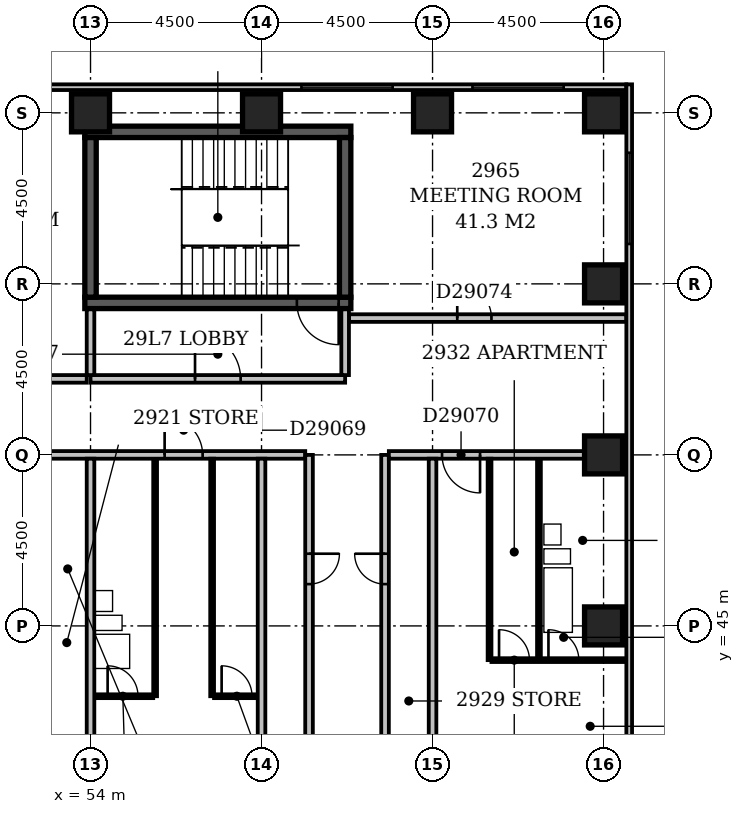
"""IFC4 building model, lengths in metres.
Left out: names, types, materials, properties, quantities, classifications, styles, units other than length and angle.
Written with IfcOpenShell. Run it as: python <this file> out.ifc"""

import sys

from ifc_helpers import new_model, si_unit, direction, frame, frame_2d, origin, origin_2d, place, context, subcontext, project, spatial, rectangle, extrude, element, fill, save


model = new_model("IFC4")
c1 = context("Model", 3, precision=1e-05, world=origin(), true_north=direction((0.0, 1.0)))
c2 = subcontext(c1, "Body", "Model", "MODEL_VIEW")
j1 = project(units=[si_unit("LENGTHUNIT", "METRE"), si_unit("PLANEANGLEUNIT", "RADIAN")], contexts=[c1])
p1 = place(None, origin())
s1 = spatial("IfcSite", under=j1, at=p1, CompositionType="ELEMENT")
p2 = place(p1, origin())
s2 = spatial("IfcBuilding", under=s1, at=p2, CompositionType="ELEMENT")
p3 = place(p2, frame((0.0, 0.0, 119.6)))
s3 = spatial("IfcBuildingStorey", under=s2, at=p3, CompositionType="ELEMENT", Elevation=119.6)
p4 = place(p3, frame((53.85, 53.5, -0.3), z_axis=(0.0, 0.0, 1.0), x_axis=(1.0, 0.0, 0.0)))
e1 = element("IfcWall", 1, at=p4, inside=s3, PredefinedType="SHEAR", context=c2, shape_type="SweptSolid", body=[
    extrude(rectangle(XDim=7.0, YDim=0.3, at=frame_2d((3.5, 0.0))), origin(), (0.0, 0.0, 1.0), 3.6),
])
p5 = place(p4, frame((5.58, 0.0, 0.3)))
e2 = element("IfcOpeningElement", 2, at=p5, cuts=e1, PredefinedType="OPENING", context=c2, shape_type="SweptSolid", body=[
    extrude(rectangle(XDim=1.1, YDim=2.1, at=frame_2d((0.55, 1.05))), frame((0.0, 0.162, 0.0), z_axis=(0.0, -1.0, 0.0), x_axis=(1.0, 0.0, 0.0)), (0.0, 0.0, 1.0), 0.324),
])
p6 = place(p3, frame((53.85, 58.0, -0.3), z_axis=(0.0, 0.0, 1.0), x_axis=(1.0, 0.0, 0.0)))
e3 = element("IfcWall", 3, at=p6, inside=s3, PredefinedType="SHEAR", context=c2, shape_type="SweptSolid", body=[
    extrude(rectangle(XDim=7.0, YDim=0.3, at=frame_2d((3.5, 0.0))), origin(), (0.0, 0.0, 1.0), 3.6),
])
for number, where, z_axis, x_axis in (
    (4, (54.0, 53.65, -0.3), (0.0, 0.0, 1.0), (0.0, 1.0, 0.0)),
    (5, (60.7, 53.65, -0.3), (0.0, 0.0, 1.0), (0.0, 1.0, 0.0)),
):
    element("IfcWall", number, at=place(p3, frame(where, z_axis=z_axis, x_axis=x_axis)), inside=s3, PredefinedType="SHEAR", context=c2, shape_type="SweptSolid", body=[
        extrude(rectangle(XDim=4.2, YDim=0.3, at=frame_2d((2.1, 0.0))), origin(), (0.0, 0.0, 1.0), 3.6),
    ])
for number, where, z_axis, x_axis in (
    (6, (67.5, 45.0, -0.3), (0.0, 0.0, 1.0), (1.0, 0.0, 0.0)),
    (7, (67.5, 49.5, -0.3), (0.0, 0.0, 1.0), (1.0, 0.0, 0.0)),
    (8, (67.5, 54.0, -0.3), (0.0, 0.0, 1.0), (1.0, 0.0, 0.0)),
    (9, (54.0, 58.5, -0.3), (0.0, 0.0, 1.0), (1.0, 0.0, 0.0)),
    (10, (58.5, 58.5, -0.3), (0.0, 0.0, 1.0), (1.0, 0.0, 0.0)),
    (11, (63.0, 58.5, -0.3), (0.0, 0.0, 1.0), (1.0, 0.0, 0.0)),
    (12, (67.5, 58.5, -0.3), (0.0, 0.0, 1.0), (1.0, 0.0, 0.0)),
):
    element("IfcColumn", number, at=place(p3, frame(where, z_axis=z_axis, x_axis=x_axis)), inside=s3, PredefinedType="COLUMN", context=c2, shape_type="SweptSolid", body=[
        extrude(rectangle(XDim=1.0, YDim=1.0, at=origin_2d()), origin(), (0.0, 0.0, 1.0), 3.6),
    ])
p7 = place(p3, frame((68.175, 35.4, 0.0), z_axis=(0.0, 0.0, 1.0), x_axis=(0.0, 1.0, 0.0)))
e13 = element("IfcWall", 13, at=p7, inside=s3, PredefinedType="STANDARD", context=c2, shape_type="SweptSolid", body=[
    extrude(rectangle(XDim=23.85, YDim=0.15, at=frame_2d((11.925, 0.0))), origin(), (0.0, 0.0, 1.0), 2.7),
])
p8 = place(p7, frame((1.65, 0.0, 0.6)))
e14 = element("IfcOpeningElement", 14, at=p8, cuts=e13, PredefinedType="OPENING", context=c2, shape_type="SweptSolid", body=[
    extrude(rectangle(XDim=2.4, YDim=1.8, at=frame_2d((1.2, 0.9))), frame((0.0, 0.087, 0.0), z_axis=(0.0, -1.0, 0.0), x_axis=(1.0, 0.0, 0.0)), (0.0, 0.0, 1.0), 0.174),
])
p9 = place(p7, frame((19.65, 0.0, 0.6)))
e15 = element("IfcOpeningElement", 15, at=p9, cuts=e13, PredefinedType="OPENING", context=c2, shape_type="SweptSolid", body=[
    extrude(rectangle(XDim=2.4, YDim=1.8, at=frame_2d((1.2, 0.9))), frame((0.0, 0.087, 0.0), z_axis=(0.0, -1.0, 0.0), x_axis=(1.0, 0.0, 0.0)), (0.0, 0.0, 1.0), 0.174),
])
p10 = place(p3, frame((68.1, 59.175, 0.0), z_axis=(0.0, 0.0, 1.0), x_axis=(-1.0, 0.0, 0.0)))
e16 = element("IfcWall", 16, at=p10, inside=s3, PredefinedType="STANDARD", context=c2, shape_type="SweptSolid", body=[
    extrude(rectangle(XDim=68.85, YDim=0.15, at=frame_2d((34.425, 0.0))), origin(), (0.0, 0.0, 1.0), 2.7),
])
p11 = place(p10, frame((1.65, 0.0, 0.6)))
e17 = element("IfcOpeningElement", 17, at=p11, cuts=e16, PredefinedType="OPENING", context=c2, shape_type="SweptSolid", body=[
    extrude(rectangle(XDim=2.4, YDim=1.8, at=frame_2d((1.2, 0.9))), frame((0.0, 0.087, 0.0), z_axis=(0.0, -1.0, 0.0), x_axis=(1.0, 0.0, 0.0)), (0.0, 0.0, 1.0), 0.174),
])
p12 = place(p10, frame((6.15, 0.0, 0.6)))
e18 = element("IfcOpeningElement", 18, at=p12, cuts=e16, PredefinedType="OPENING", context=c2, shape_type="SweptSolid", body=[
    extrude(rectangle(XDim=2.4, YDim=1.8, at=frame_2d((1.2, 0.9))), frame((0.0, 0.087, 0.0), z_axis=(0.0, -1.0, 0.0), x_axis=(1.0, 0.0, 0.0)), (0.0, 0.0, 1.0), 0.174),
])
p13 = place(p10, frame((16.347, 0.0, 0.6)))
e19 = element("IfcOpeningElement", 19, at=p13, cuts=e16, PredefinedType="OPENING", context=c2, shape_type="SweptSolid", body=[
    extrude(rectangle(XDim=1.5, YDim=1.8, at=frame_2d((0.75, 0.9))), frame((0.0, 0.087, 0.0), z_axis=(0.0, -1.0, 0.0), x_axis=(1.0, 0.0, 0.0)), (0.0, 0.0, 1.0), 0.174),
])
p14 = place(p10, frame((19.65, 0.0, 0.6)))
e20 = element("IfcOpeningElement", 20, at=p14, cuts=e16, PredefinedType="OPENING", context=c2, shape_type="SweptSolid", body=[
    extrude(rectangle(XDim=2.4, YDim=1.8, at=frame_2d((1.2, 0.9))), frame((0.0, 0.087, 0.0), z_axis=(0.0, -1.0, 0.0), x_axis=(1.0, 0.0, 0.0)), (0.0, 0.0, 1.0), 0.174),
])
p15 = place(p10, frame((37.678, 0.0, 0.6)))
e21 = element("IfcOpeningElement", 21, at=p15, cuts=e16, PredefinedType="OPENING", context=c2, shape_type="SweptSolid", body=[
    extrude(rectangle(XDim=1.2, YDim=1.8, at=frame_2d((0.6, 0.9))), frame((0.0, 0.087, 0.0), z_axis=(0.0, -1.0, 0.0), x_axis=(1.0, 0.0, 0.0)), (0.0, 0.0, 1.0), 0.174),
])
p16 = place(p3, frame((54.0, 51.5, 0.0), z_axis=(0.0, 0.0, 1.0), x_axis=(1.0, 0.0, 0.0)))
e22 = element("IfcWall", 22, at=p16, inside=s3, PredefinedType="PARTITIONING", context=c2, shape_type="SweptSolid", body=[
    extrude(rectangle(XDim=6.7, YDim=0.2, at=frame_2d((3.35, 0.0))), origin(), (0.0, 0.0, 1.0), 3.3),
])
p17 = place(p16, frame((2.75, 0.0, 0.0)))
e23 = element("IfcOpeningElement", 23, at=p17, cuts=e22, PredefinedType="OPENING", context=c2, shape_type="SweptSolid", body=[
    extrude(rectangle(XDim=1.2, YDim=2.1, at=frame_2d((0.6, 1.05))), frame((0.0, 0.112, 0.0), z_axis=(0.0, -1.0, 0.0), x_axis=(1.0, 0.0, 0.0)), (0.0, 0.0, 1.0), 0.224),
])
p18 = place(p3, frame((60.7, 51.6, 0.0), z_axis=(0.0, 0.0, 1.0), x_axis=(0.0, 1.0, 0.0)))
e24 = element("IfcWall", 24, at=p18, inside=s3, PredefinedType="PARTITIONING", context=c2, shape_type="SweptSolid", body=[
    extrude(rectangle(XDim=1.73, YDim=0.2, at=frame_2d((0.865, 0.0))), origin(), (0.0, 0.0, 1.0), 3.3),
])
p19 = place(p3, frame((54.0, 51.6, 0.0), z_axis=(0.0, 0.0, 1.0), x_axis=(0.0, 1.0, 0.0)))
e25 = element("IfcWall", 25, at=p19, inside=s3, PredefinedType="PARTITIONING", context=c2, shape_type="SweptSolid", body=[
    extrude(rectangle(XDim=1.73, YDim=0.2, at=frame_2d((0.865, 0.0))), origin(), (0.0, 0.0, 1.0), 2.6),
])
p20 = place(p3, frame((54.0, 36.5, 0.0), z_axis=(0.0, 0.0, 1.0), x_axis=(0.0, 1.0, 0.0)))
e26 = element("IfcWall", 26, at=p20, inside=s3, PredefinedType="PARTITIONING", context=c2, shape_type="SweptSolid", body=[
    extrude(rectangle(XDim=12.9, YDim=0.2, at=frame_2d((6.45, 0.0))), origin(), (0.0, 0.0, 1.0), 2.6),
])
p21 = place(p3, frame((58.5, 36.5, 0.0), z_axis=(0.0, 0.0, 1.0), x_axis=(0.0, 1.0, 0.0)))
e27 = element("IfcWall", 27, at=p21, inside=s3, PredefinedType="PARTITIONING", context=c2, shape_type="SweptSolid", body=[
    extrude(rectangle(XDim=12.9, YDim=0.2, at=frame_2d((6.45, 0.0))), origin(), (0.0, 0.0, 1.0), 3.3),
])
p22 = place(p3, frame((63.0, 36.5, 0.0), z_axis=(0.0, 0.0, 1.0), x_axis=(0.0, 1.0, 0.0)))
e28 = element("IfcWall", 28, at=p22, inside=s3, PredefinedType="PARTITIONING", context=c2, shape_type="SweptSolid", body=[
    extrude(rectangle(XDim=12.9, YDim=0.2, at=frame_2d((6.45, 0.0))), origin(), (0.0, 0.0, 1.0), 2.4),
])
p23 = place(p3, frame((59.75, 40.55, 0.0), z_axis=(0.0, 0.0, 1.0), x_axis=(0.0, 1.0, 0.0)))
e29 = element("IfcWall", 29, at=p23, inside=s3, PredefinedType="PARTITIONING", context=c2, shape_type="SweptSolid", body=[
    extrude(rectangle(XDim=8.95, YDim=0.2, at=frame_2d((4.475, 0.0))), origin(), (0.0, 0.0, 1.0), 3.3),
])
p24 = place(p23, frame((5.55, 0.0, 0.0)))
e30 = element("IfcOpeningElement", 30, at=p24, cuts=e29, PredefinedType="OPENING", context=c2, shape_type="SweptSolid", body=[
    extrude(rectangle(XDim=0.8, YDim=2.1, at=frame_2d((0.4, 1.05))), frame((0.0, 0.112, 0.0), z_axis=(0.0, -1.0, 0.0), x_axis=(1.0, 0.0, 0.0)), (0.0, 0.0, 1.0), 0.224),
])
p25 = place(p3, frame((61.75, 40.55, 0.0), z_axis=(0.0, 0.0, 1.0), x_axis=(0.0, 1.0, 0.0)))
e31 = element("IfcWall", 31, at=p25, inside=s3, PredefinedType="PARTITIONING", context=c2, shape_type="SweptSolid", body=[
    extrude(rectangle(XDim=8.95, YDim=0.2, at=frame_2d((4.475, 0.0))), origin(), (0.0, 0.0, 1.0), 3.3),
])
p26 = place(p25, frame((5.55, 0.0, 0.0)))
e32 = element("IfcOpeningElement", 32, at=p26, cuts=e31, PredefinedType="OPENING", context=c2, shape_type="SweptSolid", body=[
    extrude(rectangle(XDim=0.8, YDim=2.1, at=frame_2d((0.4, 1.05))), frame((0.0, 0.112, 0.0), z_axis=(0.0, -1.0, 0.0), x_axis=(1.0, 0.0, 0.0)), (0.0, 0.0, 1.0), 0.224),
])
p27 = place(p3, frame((54.1, 43.15, 0.0), z_axis=(0.0, 0.0, 1.0), x_axis=(1.0, 0.0, 0.0)))
e33 = element("IfcWall", 33, at=p27, inside=s3, PredefinedType="PARTITIONING", context=c2, shape_type="SweptSolid", body=[
    extrude(rectangle(XDim=1.55, YDim=0.1, at=frame_2d((0.775, 0.0))), origin(), (0.0, 0.0, 1.0), 3.3),
])
p28 = place(p27, frame((0.35, 0.0, 0.0)))
e34 = element("IfcOpeningElement", 34, at=p28, cuts=e33, PredefinedType="OPENING", context=c2, shape_type="SweptSolid", body=[
    extrude(rectangle(XDim=0.8, YDim=2.1, at=frame_2d((0.4, 1.05))), frame((0.0, 0.062, 0.0), z_axis=(0.0, -1.0, 0.0), x_axis=(1.0, 0.0, 0.0)), (0.0, 0.0, 1.0), 0.124),
])
p29 = place(p3, frame((55.7, 43.15, 0.0), z_axis=(0.0, 0.0, 1.0), x_axis=(0.0, 1.0, 0.0)))
e35 = element("IfcWall", 35, at=p29, inside=s3, PredefinedType="PLUMBINGWALL", context=c2, shape_type="SweptSolid", body=[
    extrude(rectangle(XDim=6.25, YDim=0.1, at=frame_2d((3.125, 0.0))), origin(), (0.0, 0.0, 1.0), 3.3),
])
p30 = place(p3, frame((57.2, 43.15, 0.0), z_axis=(0.0, 0.0, 1.0), x_axis=(0.0, 1.0, 0.0)))
e36 = element("IfcWall", 36, at=p30, inside=s3, PredefinedType="PARTITIONING", context=c2, shape_type="SweptSolid", body=[
    extrude(rectangle(XDim=6.25, YDim=0.1, at=frame_2d((3.125, 0.0))), origin(), (0.0, 0.0, 1.0), 3.3),
])
p31 = place(p3, frame((57.25, 43.15, 0.0), z_axis=(0.0, 0.0, 1.0), x_axis=(1.0, 0.0, 0.0)))
e37 = element("IfcWall", 37, at=p31, inside=s3, PredefinedType="PARTITIONING", context=c2, shape_type="SweptSolid", body=[
    extrude(rectangle(XDim=1.15, YDim=0.1, at=frame_2d((0.575, 0.0))), origin(), (0.0, 0.0, 1.0), 3.3),
])
p32 = place(p31, frame((0.2, 0.0, 0.0)))
e38 = element("IfcOpeningElement", 38, at=p32, cuts=e37, PredefinedType="OPENING", context=c2, shape_type="SweptSolid", body=[
    extrude(rectangle(XDim=0.8, YDim=2.1, at=frame_2d((0.4, 1.05))), frame((0.0, 0.062, 0.0), z_axis=(0.0, -1.0, 0.0), x_axis=(1.0, 0.0, 0.0)), (0.0, 0.0, 1.0), 0.124),
])
p33 = place(p3, frame((64.5, 44.1, 0.0), z_axis=(0.0, 0.0, 1.0), x_axis=(0.0, 1.0, 0.0)))
e39 = element("IfcWall", 39, at=p33, inside=s3, PredefinedType="PARTITIONING", context=c2, shape_type="SweptSolid", body=[
    extrude(rectangle(XDim=5.3, YDim=0.1, at=frame_2d((2.65, 0.0))), origin(), (0.0, 0.0, 1.0), 3.3),
])
p34 = place(p3, frame((64.55, 44.1, 0.0), z_axis=(0.0, 0.0, 1.0), x_axis=(1.0, 0.0, 0.0)))
e40 = element("IfcWall", 40, at=p34, inside=s3, PredefinedType="PARTITIONING", context=c2, shape_type="SweptSolid", body=[
    extrude(rectangle(XDim=3.55, YDim=0.1, at=frame_2d((1.775, 0.0))), origin(), (0.0, 0.0, 1.0), 3.3),
])
p35 = place(p34, frame((1.5, 0.0, 0.0)))
e41 = element("IfcOpeningElement", 41, at=p35, cuts=e40, PredefinedType="OPENING", context=c2, shape_type="SweptSolid", body=[
    extrude(rectangle(XDim=0.8, YDim=2.1, at=frame_2d((0.4, 1.05))), frame((0.0, 0.062, 0.0), z_axis=(0.0, -1.0, 0.0), x_axis=(1.0, 0.0, 0.0)), (0.0, 0.0, 1.0), 0.124),
])
p36 = place(p34, frame((0.2, 0.0, 0.0)))
e42 = element("IfcOpeningElement", 42, at=p36, cuts=e40, PredefinedType="OPENING", context=c2, shape_type="SweptSolid", body=[
    extrude(rectangle(XDim=0.8, YDim=2.1, at=frame_2d((0.4, 1.05))), frame((0.0, 0.062, 0.0), z_axis=(0.0, -1.0, 0.0), x_axis=(1.0, 0.0, 0.0)), (0.0, 0.0, 1.0), 0.124),
])
p37 = place(p3, frame((65.8, 44.15, 0.0), z_axis=(0.0, 0.0, 1.0), x_axis=(0.0, 1.0, 0.0)))
e43 = element("IfcWall", 43, at=p37, inside=s3, PredefinedType="PLUMBINGWALL", context=c2, shape_type="SweptSolid", body=[
    extrude(rectangle(XDim=5.25, YDim=0.1, at=frame_2d((2.625, 0.0))), origin(), (0.0, 0.0, 1.0), 3.3),
])
p38 = place(p3, frame((52.85, 49.5, 0.0), z_axis=(0.0, 0.0, 1.0), x_axis=(1.0, 0.0, 0.0)))
e44 = element("IfcWall", 44, at=p38, inside=s3, PredefinedType="PARTITIONING", context=c2, shape_type="SweptSolid", body=[
    extrude(rectangle(XDim=6.8, YDim=0.2, at=frame_2d((3.4, 0.0))), origin(), (0.0, 0.0, 1.0), 3.3),
])
p39 = place(p38, frame((3.1, 0.0, 0.0)))
e45 = element("IfcOpeningElement", 45, at=p39, cuts=e44, PredefinedType="OPENING", context=c2, shape_type="SweptSolid", body=[
    extrude(rectangle(XDim=1.0, YDim=2.1, at=frame_2d((0.5, 1.05))), frame((0.0, 0.112, 0.0), z_axis=(0.0, -1.0, 0.0), x_axis=(1.0, 0.0, 0.0)), (0.0, 0.0, 1.0), 0.224),
])
p40 = place(p3, frame((61.85, 49.5, 0.0), z_axis=(0.0, 0.0, 1.0), x_axis=(1.0, 0.0, 0.0)))
e46 = element("IfcWall", 46, at=p40, inside=s3, PredefinedType="PARTITIONING", context=c2, shape_type="SweptSolid", body=[
    extrude(rectangle(XDim=5.15, YDim=0.2, at=frame_2d((2.575, 0.0))), origin(), (0.0, 0.0, 1.0), 3.3),
])
p41 = place(p40, frame((1.4, 0.0, 0.0)))
e47 = element("IfcOpeningElement", 47, at=p41, cuts=e46, PredefinedType="OPENING", context=c2, shape_type="SweptSolid", body=[
    extrude(rectangle(XDim=1.0, YDim=2.1, at=frame_2d((0.5, 1.05))), frame((0.0, 0.112, 0.0), z_axis=(0.0, -1.0, 0.0), x_axis=(1.0, 0.0, 0.0)), (0.0, 0.0, 1.0), 0.224),
])
p42 = place(p3, frame((44.1, 51.5, 0.0), z_axis=(0.0, 0.0, 1.0), x_axis=(1.0, 0.0, 0.0)))
e48 = element("IfcWall", 48, at=p42, inside=s3, PredefinedType="PARTITIONING", context=c2, shape_type="SweptSolid", body=[
    extrude(rectangle(XDim=9.8, YDim=0.2, at=frame_2d((4.9, 0.0))), origin(), (0.0, 0.0, 1.0), 3.3),
])
p43 = place(p42, frame((4.45, 0.0, 0.0)))
e49 = element("IfcOpeningElement", 49, at=p43, cuts=e48, PredefinedType="OPENING", context=c2, shape_type="SweptSolid", body=[
    extrude(rectangle(XDim=0.9, YDim=2.1, at=frame_2d((0.45, 1.05))), frame((0.0, 0.112, 0.0), z_axis=(0.0, -1.0, 0.0), x_axis=(1.0, 0.0, 0.0)), (0.0, 0.0, 1.0), 0.224),
])
p44 = place(p3, frame((60.8, 53.1, 0.0), z_axis=(0.0, 0.0, 1.0), x_axis=(1.0, 0.0, 0.0)))
e50 = element("IfcWall", 50, at=p44, inside=s3, PredefinedType="PARTITIONING", context=c2, shape_type="SweptSolid", body=[
    extrude(rectangle(XDim=7.3, YDim=0.2, at=frame_2d((3.65, 0.0))), origin(), (0.0, 0.0, 1.0), 3.3),
])
p45 = place(p44, frame((2.85, 0.0, 0.0)))
e51 = element("IfcOpeningElement", 51, at=p45, cuts=e50, PredefinedType="OPENING", context=c2, shape_type="SweptSolid", body=[
    extrude(rectangle(XDim=0.9, YDim=2.1, at=frame_2d((0.45, 1.05))), frame((0.0, 0.112, 0.0), z_axis=(0.0, -1.0, 0.0), x_axis=(1.0, 0.0, 0.0)), (0.0, 0.0, 1.0), 0.224),
])
p46 = place(p9, origin())
e52 = element("IfcWindow", 52, at=p46, inside=s3, PartitioningType="SINGLE_PANEL", PredefinedType="WINDOW", context=c2, shape_type="SweptSolid", body=[
    extrude(rectangle(XDim=2.4, YDim=1.8, at=frame_2d((1.2, 0.9))), frame((0.0, 0.03, 0.0), z_axis=(0.0, -1.0, 0.0), x_axis=(1.0, 0.0, 0.0)), (0.0, 0.0, 1.0), 0.06),
])
fill(e15, e52)
p47 = place(p11, origin())
e53 = element("IfcWindow", 53, at=p47, inside=s3, PartitioningType="SINGLE_PANEL", PredefinedType="WINDOW", context=c2, shape_type="SweptSolid", body=[
    extrude(rectangle(XDim=2.4, YDim=1.8, at=frame_2d((1.2, 0.9))), frame((0.0, 0.03, 0.0), z_axis=(0.0, -1.0, 0.0), x_axis=(1.0, 0.0, 0.0)), (0.0, 0.0, 1.0), 0.06),
])
fill(e17, e53)
p48 = place(p12, origin())
e54 = element("IfcWindow", 54, at=p48, inside=s3, PartitioningType="SINGLE_PANEL", PredefinedType="WINDOW", context=c2, shape_type="SweptSolid", body=[
    extrude(rectangle(XDim=2.4, YDim=1.8, at=frame_2d((1.2, 0.9))), frame((0.0, 0.03, 0.0), z_axis=(0.0, -1.0, 0.0), x_axis=(1.0, 0.0, 0.0)), (0.0, 0.0, 1.0), 0.06),
])
fill(e18, e54)
p49 = place(p17, origin())
e55 = element("IfcDoor", 55, at=p49, inside=s3, OperationType="SINGLE_SWING_LEFT", PredefinedType="DOOR", context=c2, shape_type="SweptSolid", body=[
    extrude(rectangle(XDim=1.2, YDim=2.1, at=frame_2d((0.6, 1.05))), frame((0.0, 0.025, 0.0), z_axis=(0.0, -1.0, 0.0), x_axis=(1.0, 0.0, 0.0)), (0.0, 0.0, 1.0), 0.05),
])
fill(e23, e55)
p50 = place(p5, origin())
e56 = element("IfcDoor", 56, at=p50, inside=s3, OperationType="SINGLE_SWING_RIGHT", PredefinedType="DOOR", context=c2, shape_type="SweptSolid", body=[
    extrude(rectangle(XDim=1.1, YDim=2.1, at=frame_2d((0.55, 1.05))), frame((0.0, 0.025, 0.0), z_axis=(0.0, -1.0, 0.0), x_axis=(1.0, 0.0, 0.0)), (0.0, 0.0, 1.0), 0.05),
])
fill(e2, e56)
p51 = place(p24, origin())
e57 = element("IfcDoor", 57, at=p51, inside=s3, OperationType="SINGLE_SWING_RIGHT", PredefinedType="DOOR", context=c2, shape_type="SweptSolid", body=[
    extrude(rectangle(XDim=0.8, YDim=2.1, at=frame_2d((0.4, 1.05))), frame((0.0, 0.025, 0.0), z_axis=(0.0, -1.0, 0.0), x_axis=(1.0, 0.0, 0.0)), (0.0, 0.0, 1.0), 0.05),
])
fill(e30, e57)
p52 = place(p26, frame((0.8, 0.0, 0.0), z_axis=(0.0, 0.0, 1.0), x_axis=(-1.0, 0.0, 0.0)))
e58 = element("IfcDoor", 58, at=p52, inside=s3, OperationType="SINGLE_SWING_LEFT", PredefinedType="DOOR", context=c2, shape_type="SweptSolid", body=[
    extrude(rectangle(XDim=0.8, YDim=2.1, at=frame_2d((0.4, 1.05))), frame((0.0, 0.025, 0.0), z_axis=(0.0, -1.0, 0.0), x_axis=(1.0, 0.0, 0.0)), (0.0, 0.0, 1.0), 0.05),
])
fill(e32, e58)
p53 = place(p28, origin())
e59 = element("IfcDoor", 59, at=p53, inside=s3, OperationType="SINGLE_SWING_LEFT", PredefinedType="DOOR", context=c2, shape_type="SweptSolid", body=[
    extrude(rectangle(XDim=0.8, YDim=2.1, at=frame_2d((0.4, 1.05))), frame((0.0, 0.025, 0.0), z_axis=(0.0, -1.0, 0.0), x_axis=(1.0, 0.0, 0.0)), (0.0, 0.0, 1.0), 0.05),
])
fill(e34, e59)
p54 = place(p32, origin())
e60 = element("IfcDoor", 60, at=p54, inside=s3, OperationType="SINGLE_SWING_LEFT", PredefinedType="DOOR", context=c2, shape_type="SweptSolid", body=[
    extrude(rectangle(XDim=0.8, YDim=2.1, at=frame_2d((0.4, 1.05))), frame((0.0, 0.025, 0.0), z_axis=(0.0, -1.0, 0.0), x_axis=(1.0, 0.0, 0.0)), (0.0, 0.0, 1.0), 0.05),
])
fill(e38, e60)
p55 = place(p35, origin())
e61 = element("IfcDoor", 61, at=p55, inside=s3, OperationType="SINGLE_SWING_LEFT", PredefinedType="DOOR", context=c2, shape_type="SweptSolid", body=[
    extrude(rectangle(XDim=0.8, YDim=2.1, at=frame_2d((0.4, 1.05))), frame((0.0, 0.025, 0.0), z_axis=(0.0, -1.0, 0.0), x_axis=(1.0, 0.0, 0.0)), (0.0, 0.0, 1.0), 0.05),
])
fill(e41, e61)
p56 = place(p36, origin())
e62 = element("IfcDoor", 62, at=p56, inside=s3, OperationType="SINGLE_SWING_LEFT", PredefinedType="DOOR", context=c2, shape_type="SweptSolid", body=[
    extrude(rectangle(XDim=0.8, YDim=2.1, at=frame_2d((0.4, 1.05))), frame((0.0, 0.025, 0.0), z_axis=(0.0, -1.0, 0.0), x_axis=(1.0, 0.0, 0.0)), (0.0, 0.0, 1.0), 0.05),
])
fill(e42, e62)
p57 = place(p39, origin())
e63 = element("IfcDoor", 63, at=p57, inside=s3, OperationType="SINGLE_SWING_LEFT", PredefinedType="DOOR", context=c2, shape_type="SweptSolid", body=[
    extrude(rectangle(XDim=1.0, YDim=2.1, at=frame_2d((0.5, 1.05))), frame((0.0, 0.025, 0.0), z_axis=(0.0, -1.0, 0.0), x_axis=(1.0, 0.0, 0.0)), (0.0, 0.0, 1.0), 0.05),
])
fill(e45, e63)
p58 = place(p41, origin())
e64 = element("IfcDoor", 64, at=p58, inside=s3, OperationType="SINGLE_SWING_RIGHT", PredefinedType="DOOR", context=c2, shape_type="SweptSolid", body=[
    extrude(rectangle(XDim=1.0, YDim=2.1, at=frame_2d((0.5, 1.05))), frame((0.0, 0.025, 0.0), z_axis=(0.0, -1.0, 0.0), x_axis=(1.0, 0.0, 0.0)), (0.0, 0.0, 1.0), 0.05),
])
fill(e47, e64)
p59 = place(p45, origin())
e65 = element("IfcDoor", 65, at=p59, inside=s3, OperationType="SINGLE_SWING_LEFT", PredefinedType="DOOR", context=c2, shape_type="SweptSolid", body=[
    extrude(rectangle(XDim=0.9, YDim=2.1, at=frame_2d((0.45, 1.05))), frame((0.0, 0.025, 0.0), z_axis=(0.0, -1.0, 0.0), x_axis=(1.0, 0.0, 0.0)), (0.0, 0.0, 1.0), 0.05),
])
fill(e51, e65)
save(model, sys.argv[1])
